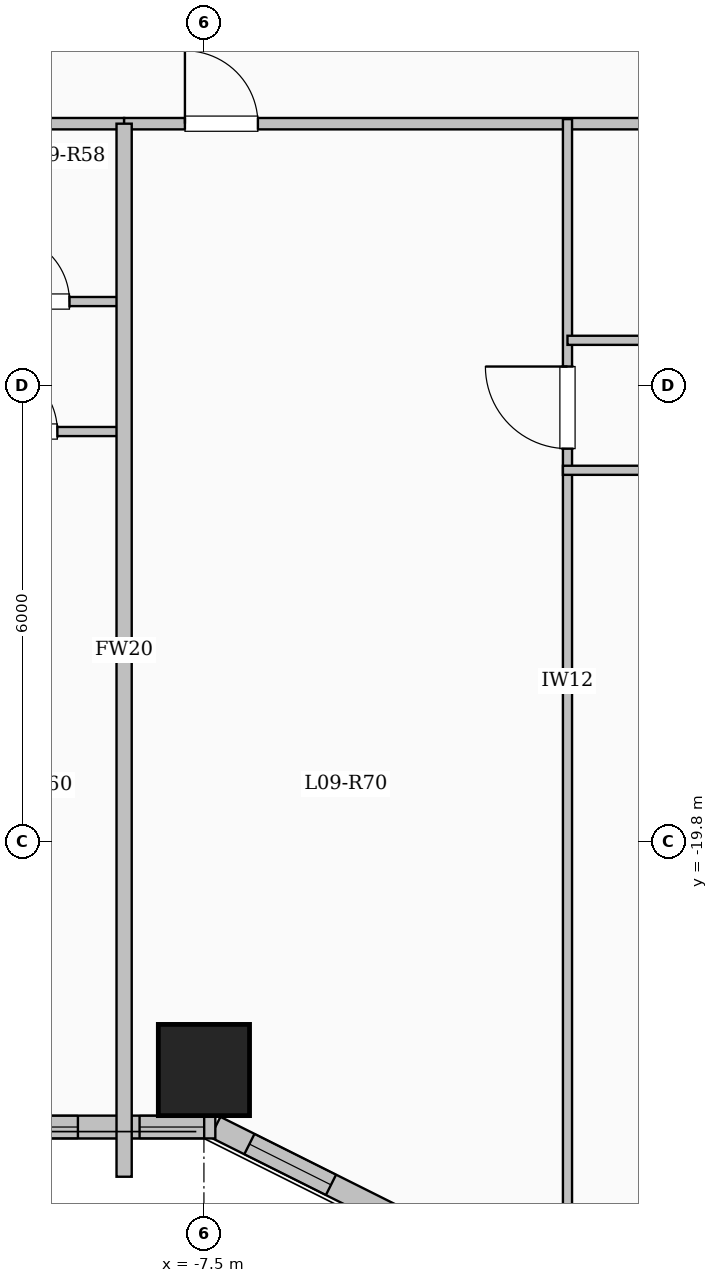
"""IFC4 building model, lengths in metres.
Left out: names, types, materials, properties, quantities, classifications, styles, units other than length and angle.
Written with IfcOpenShell. Run it as: python <this file> out.ifc"""

import sys

from ifc_helpers import new_model, si_unit, direction, frame, frame_2d, origin, origin_2d, place, context, subcontext, project, spatial, rectangle, extrude, element, fill, save


model = new_model("IFC4")
c1 = context("Model", 3, precision=1e-05, world=origin(), true_north=direction((0.0, 1.0)))
c2 = subcontext(c1, "Body", "Model", "MODEL_VIEW")
j1 = project(units=[si_unit("LENGTHUNIT", "METRE"), si_unit("PLANEANGLEUNIT", "RADIAN")], contexts=[c1])
p1 = place(None, origin())
s1 = spatial("IfcSite", under=j1, at=p1, CompositionType="ELEMENT")
p2 = place(p1, origin())
s2 = spatial("IfcBuilding", under=s1, at=p2, CompositionType="ELEMENT")
p3 = place(p2, frame((0.0, 0.0, 37.4)))
s3 = spatial("IfcBuildingStorey", under=s2, at=p3, CompositionType="ELEMENT", Elevation=37.4)
p4 = place(p3, frame((-7.5, -22.8, 0.0), z_axis=(0.0, 0.0, 1.0), x_axis=(1.0, 0.0, 0.0)))
e1 = element("IfcColumn", 1, at=p4, inside=s3, PredefinedType="COLUMN", context=c2, shape_type="SweptSolid", body=[
    extrude(rectangle(XDim=1.2, YDim=1.2, at=origin_2d()), origin(), (0.0, 0.0, 1.0), 3.35),
])
p5 = place(p3, frame((-4.35, -25.05, 0.0), z_axis=(0.0, 0.0, 1.0), x_axis=(-0.894427191, 0.4472135955, 0.0)))
e2 = element("IfcWall", 2, at=p5, inside=s3, PredefinedType="SOLIDWALL", context=c2, shape_type="SweptSolid", body=[
    extrude(rectangle(XDim=3.354, YDim=0.3, at=frame_2d((1.677, 0.0))), origin(), (0.0, 0.0, 1.0), 3.1),
])
p6 = place(p5, frame((1.653, 0.0, 0.95)))
e3 = element("IfcOpeningElement", 3, at=p6, cuts=e2, PredefinedType="OPENING", context=c2, shape_type="SweptSolid", body=[
    extrude(rectangle(XDim=1.2, YDim=1.5, at=frame_2d((0.6, 0.75))), frame((0.0, 0.16, 0.0), z_axis=(0.0, -1.0, 0.0), x_axis=(1.0, 0.0, 0.0)), (0.0, 0.0, 1.0), 0.32),
])
p7 = place(p3, frame((-7.35, -23.55, 0.0), z_axis=(0.0, 0.0, 1.0), x_axis=(-1.0, 0.0, 0.0)))
e4 = element("IfcWall", 4, at=p7, inside=s3, PredefinedType="SOLIDWALL", context=c2, shape_type="SweptSolid", body=[
    extrude(rectangle(XDim=15.3, YDim=0.3, at=frame_2d((7.65, 0.0))), origin(), (0.0, 0.0, 1.0), 3.1),
])
p8 = place(p7, frame((0.147, 0.0, 0.95)))
e5 = element("IfcOpeningElement", 5, at=p8, cuts=e4, PredefinedType="OPENING", context=c2, shape_type="SweptSolid", body=[
    extrude(rectangle(XDim=0.85, YDim=1.5, at=frame_2d((0.425, 0.75))), frame((0.0, 0.16, 0.0), z_axis=(0.0, -1.0, 0.0), x_axis=(1.0, 0.0, 0.0)), (0.0, 0.0, 1.0), 0.32),
])
p9 = place(p7, frame((1.808, 0.0, 0.95)))
e6 = element("IfcOpeningElement", 6, at=p9, cuts=e4, PredefinedType="OPENING", context=c2, shape_type="SweptSolid", body=[
    extrude(rectangle(XDim=1.2, YDim=1.5, at=frame_2d((0.6, 0.75))), frame((0.0, 0.16, 0.0), z_axis=(0.0, -1.0, 0.0), x_axis=(1.0, 0.0, 0.0)), (0.0, 0.0, 1.0), 0.32),
])
p10 = place(p7, frame((4.154, 0.0, 0.95)))
e7 = element("IfcOpeningElement", 7, at=p10, cuts=e4, PredefinedType="OPENING", context=c2, shape_type="SweptSolid", body=[
    extrude(rectangle(XDim=1.2, YDim=1.5, at=frame_2d((0.6, 0.75))), frame((0.0, 0.16, 0.0), z_axis=(0.0, -1.0, 0.0), x_axis=(1.0, 0.0, 0.0)), (0.0, 0.0, 1.0), 0.32),
])
p11 = place(p7, frame((6.724, 0.0, 0.9)))
e8 = element("IfcOpeningElement", 8, at=p11, cuts=e4, PredefinedType="OPENING", context=c2, shape_type="SweptSolid", body=[
    extrude(rectangle(XDim=1.5, YDim=1.65, at=frame_2d((0.75, 0.825))), frame((0.0, 0.16, 0.0), z_axis=(0.0, -1.0, 0.0), x_axis=(1.0, 0.0, 0.0)), (0.0, 0.0, 1.0), 0.32),
])
p12 = place(p7, frame((9.784, 0.0, 0.9)))
e9 = element("IfcOpeningElement", 9, at=p12, cuts=e4, PredefinedType="OPENING", context=c2, shape_type="SweptSolid", body=[
    extrude(rectangle(XDim=1.5, YDim=1.65, at=frame_2d((0.75, 0.825))), frame((0.0, 0.16, 0.0), z_axis=(0.0, -1.0, 0.0), x_axis=(1.0, 0.0, 0.0)), (0.0, 0.0, 1.0), 0.32),
])
p13 = place(p7, frame((12.869, 0.0, 0.9)))
e10 = element("IfcOpeningElement", 10, at=p13, cuts=e4, PredefinedType="OPENING", context=c2, shape_type="SweptSolid", body=[
    extrude(rectangle(XDim=1.5, YDim=1.65, at=frame_2d((0.75, 0.825))), frame((0.0, 0.16, 0.0), z_axis=(0.0, -1.0, 0.0), x_axis=(1.0, 0.0, 0.0)), (0.0, 0.0, 1.0), 0.32),
])
p14 = place(p3, frame((-22.55, -10.35, 0.0), z_axis=(0.0, 0.0, 1.0), x_axis=(1.0, 0.0, 0.0)))
e11 = element("IfcWall", 11, at=p14, inside=s3, PredefinedType="PARTITIONING", context=c2, shape_type="SweptSolid", body=[
    extrude(rectangle(XDim=14.0, YDim=0.15, at=frame_2d((7.0, 0.0))), origin(), (0.0, 0.0, 1.0), 3.1),
])
p15 = place(p14, frame((0.7, 0.0, 0.0)))
e12 = element("IfcOpeningElement", 12, at=p15, cuts=e11, PredefinedType="OPENING", context=c2, shape_type="SweptSolid", body=[
    extrude(rectangle(XDim=0.96, YDim=2.15, at=frame_2d((0.48, 1.075))), frame((0.0, 0.085, 0.0), z_axis=(0.0, -1.0, 0.0), x_axis=(1.0, 0.0, 0.0)), (0.0, 0.0, 1.0), 0.17),
])
p16 = place(p14, frame((6.838, 0.0, 0.0)))
e13 = element("IfcOpeningElement", 13, at=p16, cuts=e11, PredefinedType="OPENING", context=c2, shape_type="SweptSolid", body=[
    extrude(rectangle(XDim=0.96, YDim=2.15, at=frame_2d((0.48, 1.075))), frame((0.0, 0.085, 0.0), z_axis=(0.0, -1.0, 0.0), x_axis=(1.0, 0.0, 0.0)), (0.0, 0.0, 1.0), 0.17),
])
p17 = place(p3, frame((-8.55, -10.35, 0.0), z_axis=(0.0, 0.0, 1.0), x_axis=(1.0, 0.0, 0.0)))
e14 = element("IfcWall", 14, at=p17, inside=s3, PredefinedType="PARTITIONING", context=c2, shape_type="SweptSolid", body=[
    extrude(rectangle(XDim=17.1, YDim=0.15, at=frame_2d((8.55, 0.0))), origin(), (0.0, 0.0, 1.0), 3.1),
])
p18 = place(p17, frame((0.8, 0.0, 0.0)))
e15 = element("IfcOpeningElement", 15, at=p18, cuts=e14, PredefinedType="OPENING", context=c2, shape_type="SweptSolid", body=[
    extrude(rectangle(XDim=0.96, YDim=2.15, at=frame_2d((0.48, 1.075))), frame((0.0, 0.085, 0.0), z_axis=(0.0, -1.0, 0.0), x_axis=(1.0, 0.0, 0.0)), (0.0, 0.0, 1.0), 0.17),
])
p19 = place(p3, frame((-10.818, -12.69, 0.0), z_axis=(0.0, 0.0, 1.0), x_axis=(1.0, 0.0, 0.0)))
e16 = element("IfcWall", 16, at=p19, inside=s3, PredefinedType="PARTITIONING", context=c2, shape_type="SweptSolid", body=[
    extrude(rectangle(XDim=2.218, YDim=0.12, at=frame_2d((1.109, 0.0))), origin(), (0.0, 0.0, 1.0), 2.585),
])
p20 = place(p19, frame((0.669, 0.0, 0.0)))
e17 = element("IfcOpeningElement", 17, at=p20, cuts=e16, PredefinedType="OPENING", context=c2, shape_type="SweptSolid", body=[
    extrude(rectangle(XDim=0.88, YDim=2.1, at=frame_2d((0.44, 1.05))), frame((0.0, 0.07, 0.0), z_axis=(0.0, -1.0, 0.0), x_axis=(1.0, 0.0, 0.0)), (0.0, 0.0, 1.0), 0.14),
])
p21 = place(p3, frame((-13.312, -14.4, 0.0), z_axis=(0.0, 0.0, 1.0), x_axis=(1.0, 0.0, 0.0)))
e18 = element("IfcWall", 18, at=p21, inside=s3, PredefinedType="PARTITIONING", context=c2, shape_type="SweptSolid", body=[
    extrude(rectangle(XDim=4.772, YDim=0.12, at=frame_2d((2.386, 0.0))), origin(), (0.0, 0.0, 1.0), 3.1),
])
p22 = place(p21, frame((0.708, 0.0, 0.0)))
e19 = element("IfcOpeningElement", 19, at=p22, cuts=e18, PredefinedType="OPENING", context=c2, shape_type="SweptSolid", body=[
    extrude(rectangle(XDim=0.88, YDim=2.1, at=frame_2d((0.44, 1.05))), frame((0.0, 0.07, 0.0), z_axis=(0.0, -1.0, 0.0), x_axis=(1.0, 0.0, 0.0)), (0.0, 0.0, 1.0), 0.14),
])
p23 = place(p21, frame((3.004, 0.0, 0.0)))
e20 = element("IfcOpeningElement", 20, at=p23, cuts=e18, PredefinedType="OPENING", context=c2, shape_type="SweptSolid", body=[
    extrude(rectangle(XDim=0.88, YDim=2.1, at=frame_2d((0.44, 1.05))), frame((0.0, 0.07, 0.0), z_axis=(0.0, -1.0, 0.0), x_axis=(1.0, 0.0, 0.0)), (0.0, 0.0, 1.0), 0.14),
])
p24 = place(p3, frame((-8.55, -24.204, 0.0), z_axis=(0.0, 0.0, 1.0), x_axis=(0.0, 1.0, 0.0)))
e21 = element("IfcWall", 21, at=p24, inside=s3, PredefinedType="SOLIDWALL", context=c2, shape_type="SweptSolid", body=[
    extrude(rectangle(XDim=13.854, YDim=0.2, at=frame_2d((6.927, 0.0))), origin(), (0.0, 0.0, 1.0), 3.1),
])
p25 = place(p3, frame((-2.717, -25.08, 0.0), z_axis=(0.0, 0.0, 1.0), x_axis=(0.0, 1.0, 0.0)))
e22 = element("IfcWall", 22, at=p25, inside=s3, PredefinedType="PARTITIONING", context=c2, shape_type="SweptSolid", body=[
    extrude(rectangle(XDim=14.79, YDim=0.12, at=frame_2d((7.395, 0.0))), origin(), (0.0, 0.0, 1.0), 3.1),
])
p26 = place(p25, frame((10.455, 0.0, 0.0)))
e23 = element("IfcOpeningElement", 23, at=p26, cuts=e22, PredefinedType="OPENING", context=c2, shape_type="SweptSolid", body=[
    extrude(rectangle(XDim=1.08, YDim=2.15, at=frame_2d((0.54, 1.075))), frame((0.0, 0.07, 0.0), z_axis=(0.0, -1.0, 0.0), x_axis=(1.0, 0.0, 0.0)), (0.0, 0.0, 1.0), 0.14),
])
p27 = place(p3, frame((-2.717, -13.2, 0.0), z_axis=(0.0, 0.0, 1.0), x_axis=(1.0, 0.0, 0.0)))
e24 = element("IfcWall", 24, at=p27, inside=s3, PredefinedType="PARTITIONING", context=c2, shape_type="SweptSolid", body=[
    extrude(rectangle(XDim=5.94, YDim=0.12, at=frame_2d((2.97, 0.0))), origin(), (0.0, 0.0, 1.0), 3.1),
])
p28 = place(p27, frame((2.53, 0.0, 0.0)))
e25 = element("IfcOpeningElement", 25, at=p28, cuts=e24, PredefinedType="OPENING", context=c2, shape_type="SweptSolid", body=[
    extrude(rectangle(XDim=0.88, YDim=2.1, at=frame_2d((0.44, 1.05))), frame((0.0, 0.07, 0.0), z_axis=(0.0, -1.0, 0.0), x_axis=(1.0, 0.0, 0.0)), (0.0, 0.0, 1.0), 0.14),
])
p29 = place(p3, frame((-2.777, -14.91, 0.0), z_axis=(0.0, 0.0, 1.0), x_axis=(1.0, 0.0, 0.0)))
e26 = element("IfcWall", 26, at=p29, inside=s3, PredefinedType="PARTITIONING", context=c2, shape_type="SweptSolid", body=[
    extrude(rectangle(XDim=11.387, YDim=0.12, at=frame_2d((5.694, 0.0))), origin(), (0.0, 0.0, 1.0), 2.585),
])
p30 = place(p29, frame((1.428, 0.0, 0.0)))
e27 = element("IfcOpeningElement", 27, at=p30, cuts=e26, PredefinedType="OPENING", context=c2, shape_type="SweptSolid", body=[
    extrude(rectangle(XDim=0.88, YDim=2.1, at=frame_2d((0.44, 1.05))), frame((0.0, 0.07, 0.0), z_axis=(0.0, -1.0, 0.0), x_axis=(1.0, 0.0, 0.0)), (0.0, 0.0, 1.0), 0.14),
])
p31 = place(p29, frame((5.164, 0.0, 0.0)))
e28 = element("IfcOpeningElement", 28, at=p31, cuts=e26, PredefinedType="OPENING", context=c2, shape_type="SweptSolid", body=[
    extrude(rectangle(XDim=0.88, YDim=2.1, at=frame_2d((0.44, 1.05))), frame((0.0, 0.07, 0.0), z_axis=(0.0, -1.0, 0.0), x_axis=(1.0, 0.0, 0.0)), (0.0, 0.0, 1.0), 0.14),
])
p32 = place(p29, frame((8.899, 0.0, 0.0)))
e29 = element("IfcOpeningElement", 29, at=p32, cuts=e26, PredefinedType="OPENING", context=c2, shape_type="SweptSolid", body=[
    extrude(rectangle(XDim=0.88, YDim=2.1, at=frame_2d((0.44, 1.05))), frame((0.0, 0.07, 0.0), z_axis=(0.0, -1.0, 0.0), x_axis=(1.0, 0.0, 0.0)), (0.0, 0.0, 1.0), 0.14),
])
p33 = place(p6, origin())
e30 = element("IfcWindow", 30, at=p33, inside=s3, PartitioningType="SINGLE_PANEL", PredefinedType="WINDOW", context=c2, shape_type="SweptSolid", body=[
    extrude(rectangle(XDim=1.2, YDim=1.5, at=frame_2d((0.6, 0.75))), frame((0.0, 0.03, 0.0), z_axis=(0.0, -1.0, 0.0), x_axis=(1.0, 0.0, 0.0)), (0.0, 0.0, 1.0), 0.06),
])
fill(e3, e30)
p34 = place(p8, origin())
e31 = element("IfcWindow", 31, at=p34, inside=s3, PartitioningType="SINGLE_PANEL", PredefinedType="WINDOW", context=c2, shape_type="SweptSolid", body=[
    extrude(rectangle(XDim=0.85, YDim=1.5, at=frame_2d((0.425, 0.75))), frame((0.0, 0.03, 0.0), z_axis=(0.0, -1.0, 0.0), x_axis=(1.0, 0.0, 0.0)), (0.0, 0.0, 1.0), 0.06),
])
fill(e5, e31)
p35 = place(p9, origin())
e32 = element("IfcWindow", 32, at=p35, inside=s3, PartitioningType="SINGLE_PANEL", PredefinedType="WINDOW", context=c2, shape_type="SweptSolid", body=[
    extrude(rectangle(XDim=1.2, YDim=1.5, at=frame_2d((0.6, 0.75))), frame((0.0, 0.03, 0.0), z_axis=(0.0, -1.0, 0.0), x_axis=(1.0, 0.0, 0.0)), (0.0, 0.0, 1.0), 0.06),
])
fill(e6, e32)
p36 = place(p20, origin())
e33 = element("IfcDoor", 33, at=p36, inside=s3, OperationType="SINGLE_SWING_LEFT", PredefinedType="DOOR", context=c2, shape_type="SweptSolid", body=[
    extrude(rectangle(XDim=0.88, YDim=2.1, at=frame_2d((0.44, 1.05))), frame((0.0, 0.025, 0.0), z_axis=(0.0, -1.0, 0.0), x_axis=(1.0, 0.0, 0.0)), (0.0, 0.0, 1.0), 0.05),
])
fill(e17, e33)
p37 = place(p23, origin())
e34 = element("IfcDoor", 34, at=p37, inside=s3, OperationType="SINGLE_SWING_LEFT", PredefinedType="DOOR", context=c2, shape_type="SweptSolid", body=[
    extrude(rectangle(XDim=0.88, YDim=2.1, at=frame_2d((0.44, 1.05))), frame((0.0, 0.025, 0.0), z_axis=(0.0, -1.0, 0.0), x_axis=(1.0, 0.0, 0.0)), (0.0, 0.0, 1.0), 0.05),
])
fill(e20, e34)
p38 = place(p18, origin())
e35 = element("IfcDoor", 35, at=p38, inside=s3, OperationType="SINGLE_SWING_LEFT", PredefinedType="DOOR", context=c2, shape_type="SweptSolid", body=[
    extrude(rectangle(XDim=0.96, YDim=2.15, at=frame_2d((0.48, 1.075))), frame((0.0, 0.025, 0.0), z_axis=(0.0, -1.0, 0.0), x_axis=(1.0, 0.0, 0.0)), (0.0, 0.0, 1.0), 0.05),
])
fill(e15, e35)
p39 = place(p26, origin())
e36 = element("IfcDoor", 36, at=p39, inside=s3, OperationType="SINGLE_SWING_RIGHT", PredefinedType="DOOR", context=c2, shape_type="SweptSolid", body=[
    extrude(rectangle(XDim=1.08, YDim=2.15, at=frame_2d((0.54, 1.075))), frame((0.0, 0.025, 0.0), z_axis=(0.0, -1.0, 0.0), x_axis=(1.0, 0.0, 0.0)), (0.0, 0.0, 1.0), 0.05),
])
fill(e23, e36)
save(model, sys.argv[1])
